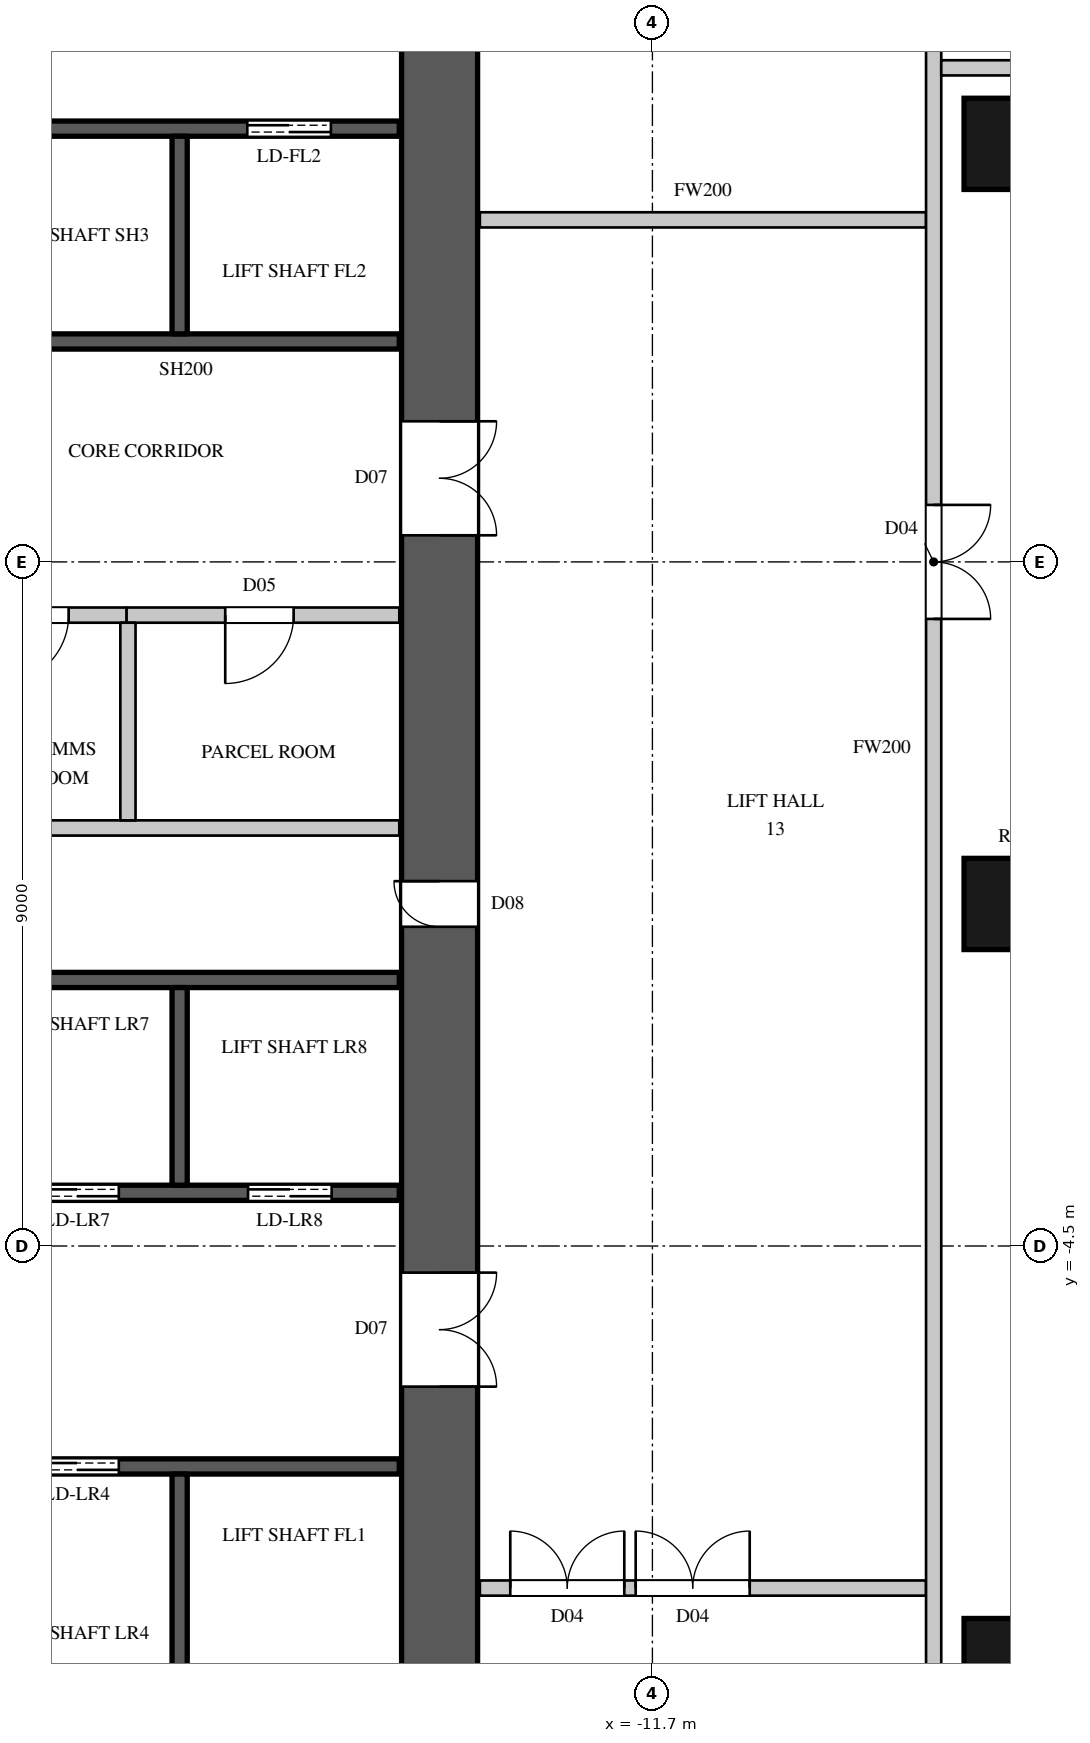
"""IFC4 building model, lengths in metres.
Left out: names, types, materials, properties, quantities, classifications, styles, units other than length and angle.
Written with IfcOpenShell. Run it as: python <this file> out.ifc"""

import sys

from ifc_helpers import new_model, si_unit, direction, frame, frame_2d, origin, origin_2d, place, context, subcontext, project, spatial, rectangle, circle, extrude, element, fill, save


model = new_model("IFC4")
c1 = context("Model", 3, precision=1e-05, world=origin(), true_north=direction((0.0, 1.0)))
c2 = subcontext(c1, "Body", "Model", "MODEL_VIEW")
j1 = project(units=[si_unit("LENGTHUNIT", "METRE"), si_unit("PLANEANGLEUNIT", "RADIAN")], contexts=[c1])
p1 = place(None, origin())
s1 = spatial("IfcSite", under=j1, at=p1, CompositionType="ELEMENT")
p2 = place(p1, origin())
s2 = spatial("IfcBuilding", under=s1, at=p2, CompositionType="ELEMENT")
p3 = place(p2, frame((0.0, 0.0, 77.1)))
s3 = spatial("IfcBuildingStorey", under=s2, at=p3, CompositionType="ELEMENT", Elevation=77.1)
for number, where, z_axis, x_axis in (
    (1, (-7.0, -10.0, 0.0), (0.0, 0.0, 1.0), (1.0, 0.0, 0.0)),
    (2, (-7.0, 0.0, 0.0), (0.0, 0.0, 1.0), (1.0, 0.0, 0.0)),
    (3, (-7.0, 10.0, 0.0), (0.0, 0.0, 1.0), (1.0, 0.0, 0.0)),
):
    element("IfcColumn", number, at=place(p3, frame(where, z_axis=z_axis, x_axis=x_axis)), inside=s3, PredefinedType="COLUMN", context=c2, shape_type="SweptSolid", body=[
        extrude(circle(Radius=0.6, at=origin_2d()), origin(), (0.0, 0.0, 1.0), 3.6),
    ])
p4 = place(p3, frame((-14.5, -14.8, 0.0), z_axis=(0.0, 0.0, 1.0), x_axis=(0.0, 1.0, 0.0)))
e4 = element("IfcWall", 4, at=p4, inside=s3, PredefinedType="SHEAR", context=c2, shape_type="SweptSolid", body=[
    extrude(rectangle(XDim=29.6, YDim=1.0, at=frame_2d((14.8, 0.0))), origin(), (0.0, 0.0, 1.0), 3.6),
])
p5 = place(p4, frame((8.45, 0.0, 0.0)))
e5 = element("IfcOpeningElement", 5, at=p5, cuts=e4, PredefinedType="OPENING", context=c2, shape_type="SweptSolid", body=[
    extrude(rectangle(XDim=1.5, YDim=2.4, at=frame_2d((0.75, 1.2))), frame((0.0, 0.51, 0.0), z_axis=(0.0, -1.0, 0.0), x_axis=(1.0, 0.0, 0.0)), (0.0, 0.0, 1.0), 1.02),
])
p6 = place(p4, frame((19.65, 0.0, 0.0)))
e6 = element("IfcOpeningElement", 6, at=p6, cuts=e4, PredefinedType="OPENING", context=c2, shape_type="SweptSolid", body=[
    extrude(rectangle(XDim=1.5, YDim=2.4, at=frame_2d((0.75, 1.2))), frame((0.0, 0.51, 0.0), z_axis=(0.0, -1.0, 0.0), x_axis=(1.0, 0.0, 0.0)), (0.0, 0.0, 1.0), 1.02),
])
p7 = place(p4, frame((14.5, 0.0, 0.0)))
e7 = element("IfcOpeningElement", 7, at=p7, cuts=e4, PredefinedType="OPENING", context=c2, shape_type="SweptSolid", body=[
    extrude(rectangle(XDim=0.6, YDim=2.0, at=frame_2d((0.3, 1.0))), frame((0.0, 0.51, 0.0), z_axis=(0.0, -1.0, 0.0), x_axis=(1.0, 0.0, 0.0)), (0.0, 0.0, 1.0), 1.02),
])
p8 = place(p3, frame((-18.62, 3.8, 0.0), z_axis=(0.0, 0.0, 1.0), x_axis=(1.0, 0.0, 0.0)))
e8 = element("IfcWall", 8, at=p8, inside=s3, PredefinedType="PARTITIONING", context=c2, shape_type="SweptSolid", body=[
    extrude(rectangle(XDim=3.59, YDim=0.2, at=frame_2d((1.795, 0.0))), origin(), (0.0, 0.0, 1.0), 3.3),
])
p9 = place(p8, frame((1.3, 0.0, 0.0)))
e9 = element("IfcOpeningElement", 9, at=p9, cuts=e8, PredefinedType="OPENING", context=c2, shape_type="SweptSolid", body=[
    extrude(rectangle(XDim=0.9, YDim=2.2, at=frame_2d((0.45, 1.1))), frame((0.0, 0.11, 0.0), z_axis=(0.0, -1.0, 0.0), x_axis=(1.0, 0.0, 0.0)), (0.0, 0.0, 1.0), 0.22),
])
p10 = place(p3, frame((-13.97, -9.0, 0.0), z_axis=(0.0, 0.0, 1.0), x_axis=(1.0, 0.0, 0.0)))
e10 = element("IfcWall", 10, at=p10, inside=s3, PredefinedType="PARTITIONING", context=c2, shape_type="SweptSolid", body=[
    extrude(rectangle(XDim=5.87, YDim=0.2, at=frame_2d((2.935, 0.0))), origin(), (0.0, 0.0, 1.0), 3.3),
])
p11 = place(p10, frame((0.4, 0.0, 0.0)))
e11 = element("IfcOpeningElement", 11, at=p11, cuts=e10, PredefinedType="OPENING", context=c2, shape_type="SweptSolid", body=[
    extrude(rectangle(XDim=1.5, YDim=2.2, at=frame_2d((0.75, 1.1))), frame((0.0, 0.11, 0.0), z_axis=(0.0, -1.0, 0.0), x_axis=(1.0, 0.0, 0.0)), (0.0, 0.0, 1.0), 0.22),
])
p12 = place(p10, frame((2.05, 0.0, 0.0)))
e12 = element("IfcOpeningElement", 12, at=p12, cuts=e10, PredefinedType="OPENING", context=c2, shape_type="SweptSolid", body=[
    extrude(rectangle(XDim=1.5, YDim=2.2, at=frame_2d((0.75, 1.1))), frame((0.0, 0.11, 0.0), z_axis=(0.0, -1.0, 0.0), x_axis=(1.0, 0.0, 0.0)), (0.0, 0.0, 1.0), 0.22),
])
p13 = place(p3, frame((-13.97, 9.0, 0.0), z_axis=(0.0, 0.0, 1.0), x_axis=(1.0, 0.0, 0.0)))
e13 = element("IfcWall", 13, at=p13, inside=s3, PredefinedType="PARTITIONING", context=c2, shape_type="SweptSolid", body=[
    extrude(rectangle(XDim=5.87, YDim=0.2, at=frame_2d((2.935, 0.0))), origin(), (0.0, 0.0, 1.0), 3.3),
])
p14 = place(p3, frame((-8.0, -10.9, 0.0), z_axis=(0.0, 0.0, 1.0), x_axis=(0.0, 1.0, 0.0)))
e14 = element("IfcWall", 14, at=p14, inside=s3, PredefinedType="PARTITIONING", context=c2, shape_type="SweptSolid", body=[
    extrude(rectangle(XDim=25.9, YDim=0.2, at=frame_2d((12.95, 0.0))), origin(), (0.0, 0.0, 1.0), 3.3),
])
p15 = place(p14, frame((14.65, 0.0, 0.0)))
e15 = element("IfcOpeningElement", 15, at=p15, cuts=e14, PredefinedType="OPENING", context=c2, shape_type="SweptSolid", body=[
    extrude(rectangle(XDim=1.5, YDim=2.2, at=frame_2d((0.75, 1.1))), frame((0.0, 0.11, 0.0), z_axis=(0.0, -1.0, 0.0), x_axis=(1.0, 0.0, 0.0)), (0.0, 0.0, 1.0), 0.22),
])
p16 = place(p14, frame((24.15, 0.0, 0.0)))
e16 = element("IfcOpeningElement", 16, at=p16, cuts=e14, PredefinedType="OPENING", context=c2, shape_type="SweptSolid", body=[
    extrude(rectangle(XDim=1.6, YDim=2.4, at=frame_2d((0.8, 1.2))), frame((0.0, 0.11, 0.0), z_axis=(0.0, -1.0, 0.0), x_axis=(1.0, 0.0, 0.0)), (0.0, 0.0, 1.0), 0.22),
])
p17 = place(p3, frame((-7.9, 11.0, 0.0), z_axis=(0.0, 0.0, 1.0), x_axis=(1.0, 0.0, 0.0)))
e17 = element("IfcWall", 17, at=p17, inside=s3, PredefinedType="PARTITIONING", context=c2, shape_type="SweptSolid", body=[
    extrude(rectangle(XDim=17.9, YDim=0.2, at=frame_2d((8.95, 0.0))), origin(), (0.0, 0.0, 1.0), 3.3),
])
p18 = place(p17, frame((9.5, 0.0, 0.0)))
e18 = element("IfcOpeningElement", 18, at=p18, cuts=e17, PredefinedType="OPENING", context=c2, shape_type="SweptSolid", body=[
    extrude(rectangle(XDim=1.5, YDim=2.2, at=frame_2d((0.75, 1.1))), frame((0.0, 0.11, 0.0), z_axis=(0.0, -1.0, 0.0), x_axis=(1.0, 0.0, 0.0)), (0.0, 0.0, 1.0), 0.22),
])
p19 = place(p3, frame((-26.1, 1.0, 0.0), z_axis=(0.0, 0.0, 1.0), x_axis=(1.0, 0.0, 0.0)))
e19 = element("IfcWall", 19, at=p19, inside=s3, PredefinedType="PARTITIONING", context=c2, shape_type="SweptSolid", body=[
    extrude(rectangle(XDim=11.07, YDim=0.2, at=frame_2d((5.535, 0.0))), origin(), (0.0, 0.0, 1.0), 3.3),
])
p20 = place(p3, frame((-20.98, 3.8, 0.0), z_axis=(0.0, 0.0, 1.0), x_axis=(1.0, 0.0, 0.0)))
e20 = element("IfcWall", 20, at=p20, inside=s3, PredefinedType="PARTITIONING", context=c2, shape_type="SweptSolid", body=[
    extrude(rectangle(XDim=2.36, YDim=0.2, at=frame_2d((1.18, 0.0))), origin(), (0.0, 0.0, 1.0), 3.3),
])
p21 = place(p20, frame((0.7, 0.0, 0.0)))
e21 = element("IfcOpeningElement", 21, at=p21, cuts=e20, PredefinedType="OPENING", context=c2, shape_type="SweptSolid", body=[
    extrude(rectangle(XDim=0.9, YDim=2.2, at=frame_2d((0.45, 1.1))), frame((0.0, 0.11, 0.0), z_axis=(0.0, -1.0, 0.0), x_axis=(1.0, 0.0, 0.0)), (0.0, 0.0, 1.0), 0.22),
])
p22 = place(p3, frame((-18.6, 1.1, 0.0), z_axis=(0.0, 0.0, 1.0), x_axis=(0.0, 1.0, 0.0)))
e22 = element("IfcWall", 22, at=p22, inside=s3, PredefinedType="PARTITIONING", context=c2, shape_type="SweptSolid", body=[
    extrude(rectangle(XDim=2.6, YDim=0.2, at=frame_2d((1.3, 0.0))), origin(), (0.0, 0.0, 1.0), 3.3),
])
p23 = place(p3, frame((-28.97, -7.4, 0.0), z_axis=(0.0, 0.0, 1.0), x_axis=(1.0, 0.0, 0.0)))
e23 = element("IfcWall", 23, at=p23, inside=s3, PredefinedType="SHEAR", context=c2, shape_type="SweptSolid", body=[
    extrude(rectangle(XDim=13.94, YDim=0.2, at=frame_2d((6.97, 0.0))), origin(), (0.0, 0.0, 1.0), 3.3),
])
p24 = place(p23, frame((0.9, 0.0, 0.0)))
e24 = element("IfcOpeningElement", 24, at=p24, cuts=e23, PredefinedType="OPENING", context=c2, shape_type="SweptSolid", body=[
    extrude(rectangle(XDim=1.1, YDim=2.2, at=frame_2d((0.55, 1.1))), frame((0.0, 0.11, 0.0), z_axis=(0.0, -1.0, 0.0), x_axis=(1.0, 0.0, 0.0)), (0.0, 0.0, 1.0), 0.22),
])
p25 = place(p23, frame((3.7, 0.0, 0.0)))
e25 = element("IfcOpeningElement", 25, at=p25, cuts=e23, PredefinedType="OPENING", context=c2, shape_type="SweptSolid", body=[
    extrude(rectangle(XDim=1.1, YDim=2.2, at=frame_2d((0.55, 1.1))), frame((0.0, 0.11, 0.0), z_axis=(0.0, -1.0, 0.0), x_axis=(1.0, 0.0, 0.0)), (0.0, 0.0, 1.0), 0.22),
])
p26 = place(p23, frame((6.4, 0.0, 0.0)))
e26 = element("IfcOpeningElement", 26, at=p26, cuts=e23, PredefinedType="OPENING", context=c2, shape_type="SweptSolid", body=[
    extrude(rectangle(XDim=1.1, YDim=2.2, at=frame_2d((0.55, 1.1))), frame((0.0, 0.11, 0.0), z_axis=(0.0, -1.0, 0.0), x_axis=(1.0, 0.0, 0.0)), (0.0, 0.0, 1.0), 0.22),
])
p27 = place(p23, frame((9.15, 0.0, 0.0)))
e27 = element("IfcOpeningElement", 27, at=p27, cuts=e23, PredefinedType="OPENING", context=c2, shape_type="SweptSolid", body=[
    extrude(rectangle(XDim=1.1, YDim=2.2, at=frame_2d((0.55, 1.1))), frame((0.0, 0.11, 0.0), z_axis=(0.0, -1.0, 0.0), x_axis=(1.0, 0.0, 0.0)), (0.0, 0.0, 1.0), 0.22),
])
p28 = place(p3, frame((-28.97, -3.8, 0.0), z_axis=(0.0, 0.0, 1.0), x_axis=(1.0, 0.0, 0.0)))
e28 = element("IfcWall", 28, at=p28, inside=s3, PredefinedType="SHEAR", context=c2, shape_type="SweptSolid", body=[
    extrude(rectangle(XDim=13.94, YDim=0.2, at=frame_2d((6.97, 0.0))), origin(), (0.0, 0.0, 1.0), 3.3),
])
p29 = place(p28, frame((3.7, 0.0, 0.0)))
e29 = element("IfcOpeningElement", 29, at=p29, cuts=e28, PredefinedType="OPENING", context=c2, shape_type="SweptSolid", body=[
    extrude(rectangle(XDim=1.1, YDim=2.2, at=frame_2d((0.55, 1.1))), frame((0.0, 0.11, 0.0), z_axis=(0.0, -1.0, 0.0), x_axis=(1.0, 0.0, 0.0)), (0.0, 0.0, 1.0), 0.22),
])
p30 = place(p28, frame((6.4, 0.0, 0.0)))
e30 = element("IfcOpeningElement", 30, at=p30, cuts=e28, PredefinedType="OPENING", context=c2, shape_type="SweptSolid", body=[
    extrude(rectangle(XDim=1.1, YDim=2.2, at=frame_2d((0.55, 1.1))), frame((0.0, 0.11, 0.0), z_axis=(0.0, -1.0, 0.0), x_axis=(1.0, 0.0, 0.0)), (0.0, 0.0, 1.0), 0.22),
])
p31 = place(p28, frame((9.15, 0.0, 0.0)))
e31 = element("IfcOpeningElement", 31, at=p31, cuts=e28, PredefinedType="OPENING", context=c2, shape_type="SweptSolid", body=[
    extrude(rectangle(XDim=1.1, YDim=2.2, at=frame_2d((0.55, 1.1))), frame((0.0, 0.11, 0.0), z_axis=(0.0, -1.0, 0.0), x_axis=(1.0, 0.0, 0.0)), (0.0, 0.0, 1.0), 0.22),
])
p32 = place(p28, frame((11.95, 0.0, 0.0)))
e32 = element("IfcOpeningElement", 32, at=p32, cuts=e28, PredefinedType="OPENING", context=c2, shape_type="SweptSolid", body=[
    extrude(rectangle(XDim=1.1, YDim=2.2, at=frame_2d((0.55, 1.1))), frame((0.0, 0.11, 0.0), z_axis=(0.0, -1.0, 0.0), x_axis=(1.0, 0.0, 0.0)), (0.0, 0.0, 1.0), 0.22),
])
p33 = place(p3, frame((-28.97, -1.0, 0.0), z_axis=(0.0, 0.0, 1.0), x_axis=(1.0, 0.0, 0.0)))
e33 = element("IfcWall", 33, at=p33, inside=s3, PredefinedType="SHEAR", context=c2, shape_type="SweptSolid", body=[
    extrude(rectangle(XDim=13.94, YDim=0.2, at=frame_2d((6.97, 0.0))), origin(), (0.0, 0.0, 1.0), 3.3),
])
p34 = place(p3, frame((-20.64, 7.4, 0.0), z_axis=(0.0, 0.0, 1.0), x_axis=(1.0, 0.0, 0.0)))
e34 = element("IfcWall", 34, at=p34, inside=s3, PredefinedType="SHEAR", context=c2, shape_type="SweptSolid", body=[
    extrude(rectangle(XDim=5.61, YDim=0.2, at=frame_2d((2.805, 0.0))), origin(), (0.0, 0.0, 1.0), 3.3),
])
p35 = place(p3, frame((-19.98, 10.2, 0.0), z_axis=(0.0, 0.0, 1.0), x_axis=(1.0, 0.0, 0.0)))
e35 = element("IfcWall", 35, at=p35, inside=s3, PredefinedType="SHEAR", context=c2, shape_type="SweptSolid", body=[
    extrude(rectangle(XDim=4.95, YDim=0.2, at=frame_2d((2.475, 0.0))), origin(), (0.0, 0.0, 1.0), 3.3),
])
p36 = place(p35, frame((2.95, 0.0, 0.0)))
e36 = element("IfcOpeningElement", 36, at=p36, cuts=e35, PredefinedType="OPENING", context=c2, shape_type="SweptSolid", body=[
    extrude(rectangle(XDim=1.1, YDim=2.2, at=frame_2d((0.55, 1.1))), frame((0.0, 0.11, 0.0), z_axis=(0.0, -1.0, 0.0), x_axis=(1.0, 0.0, 0.0)), (0.0, 0.0, 1.0), 0.22),
])
p37 = place(p3, frame((-17.92, -10.1, 0.0), z_axis=(0.0, 0.0, 1.0), x_axis=(0.0, 1.0, 0.0)))
e37 = element("IfcWall", 37, at=p37, inside=s3, PredefinedType="SHEAR", context=c2, shape_type="SweptSolid", body=[
    extrude(rectangle(XDim=2.6, YDim=0.2, at=frame_2d((1.3, 0.0))), origin(), (0.0, 0.0, 1.0), 3.6),
])
p38 = place(p3, frame((-17.92, -3.7, 0.0), z_axis=(0.0, 0.0, 1.0), x_axis=(0.0, 1.0, 0.0)))
e38 = element("IfcWall", 38, at=p38, inside=s3, PredefinedType="SHEAR", context=c2, shape_type="SweptSolid", body=[
    extrude(rectangle(XDim=2.6, YDim=0.2, at=frame_2d((1.3, 0.0))), origin(), (0.0, 0.0, 1.0), 3.6),
])
p39 = place(p3, frame((-17.92, 7.5, 0.0), z_axis=(0.0, 0.0, 1.0), x_axis=(0.0, 1.0, 0.0)))
e39 = element("IfcWall", 39, at=p39, inside=s3, PredefinedType="SHEAR", context=c2, shape_type="SweptSolid", body=[
    extrude(rectangle(XDim=2.6, YDim=0.2, at=frame_2d((1.3, 0.0))), origin(), (0.0, 0.0, 1.0), 3.6),
])
p40 = place(p21, origin())
e40 = element("IfcDoor", 40, at=p40, inside=s3, OperationType="SINGLE_SWING_RIGHT", PredefinedType="DOOR", context=c2, shape_type="SweptSolid", body=[
    extrude(rectangle(XDim=0.9, YDim=2.2, at=frame_2d((0.45, 1.1))), frame((0.0, 0.025, 0.0), z_axis=(0.0, -1.0, 0.0), x_axis=(1.0, 0.0, 0.0)), (0.0, 0.0, 1.0), 0.05),
])
fill(e21, e40)
p41 = place(p9, origin())
e41 = element("IfcDoor", 41, at=p41, inside=s3, OperationType="SINGLE_SWING_RIGHT", PredefinedType="DOOR", context=c2, shape_type="SweptSolid", body=[
    extrude(rectangle(XDim=0.9, YDim=2.2, at=frame_2d((0.45, 1.1))), frame((0.0, 0.025, 0.0), z_axis=(0.0, -1.0, 0.0), x_axis=(1.0, 0.0, 0.0)), (0.0, 0.0, 1.0), 0.05),
])
fill(e9, e41)
p42 = place(p27, origin())
e42 = element("IfcDoor", 42, at=p42, inside=s3, OperationType="DOUBLE_DOOR_SLIDING", PredefinedType="DOOR", context=c2, shape_type="SweptSolid", body=[
    extrude(rectangle(XDim=1.1, YDim=2.2, at=frame_2d((0.55, 1.1))), frame((0.0, 0.025, 0.0), z_axis=(0.0, -1.0, 0.0), x_axis=(1.0, 0.0, 0.0)), (0.0, 0.0, 1.0), 0.05),
])
fill(e27, e42)
p43 = place(p31, origin())
e43 = element("IfcDoor", 43, at=p43, inside=s3, OperationType="DOUBLE_DOOR_SLIDING", PredefinedType="DOOR", context=c2, shape_type="SweptSolid", body=[
    extrude(rectangle(XDim=1.1, YDim=2.2, at=frame_2d((0.55, 1.1))), frame((0.0, 0.025, 0.0), z_axis=(0.0, -1.0, 0.0), x_axis=(1.0, 0.0, 0.0)), (0.0, 0.0, 1.0), 0.05),
])
fill(e31, e43)
p44 = place(p32, origin())
e44 = element("IfcDoor", 44, at=p44, inside=s3, OperationType="DOUBLE_DOOR_SLIDING", PredefinedType="DOOR", context=c2, shape_type="SweptSolid", body=[
    extrude(rectangle(XDim=1.1, YDim=2.2, at=frame_2d((0.55, 1.1))), frame((0.0, 0.025, 0.0), z_axis=(0.0, -1.0, 0.0), x_axis=(1.0, 0.0, 0.0)), (0.0, 0.0, 1.0), 0.05),
])
fill(e32, e44)
p45 = place(p36, origin())
e45 = element("IfcDoor", 45, at=p45, inside=s3, OperationType="DOUBLE_DOOR_SLIDING", PredefinedType="DOOR", context=c2, shape_type="SweptSolid", body=[
    extrude(rectangle(XDim=1.1, YDim=2.2, at=frame_2d((0.55, 1.1))), frame((0.0, 0.025, 0.0), z_axis=(0.0, -1.0, 0.0), x_axis=(1.0, 0.0, 0.0)), (0.0, 0.0, 1.0), 0.05),
])
fill(e36, e45)
p46 = place(p15, origin())
e46 = element("IfcDoor", 46, at=p46, inside=s3, OperationType="DOUBLE_DOOR_SINGLE_SWING", PredefinedType="DOOR", context=c2, shape_type="SweptSolid", body=[
    extrude(rectangle(XDim=1.5, YDim=2.2, at=frame_2d((0.75, 1.1))), frame((0.0, 0.025, 0.0), z_axis=(0.0, -1.0, 0.0), x_axis=(1.0, 0.0, 0.0)), (0.0, 0.0, 1.0), 0.05),
])
fill(e15, e46)
p47 = place(p11, origin())
e47 = element("IfcDoor", 47, at=p47, inside=s3, OperationType="DOUBLE_DOOR_SINGLE_SWING", PredefinedType="DOOR", context=c2, shape_type="SweptSolid", body=[
    extrude(rectangle(XDim=1.5, YDim=2.2, at=frame_2d((0.75, 1.1))), frame((0.0, 0.025, 0.0), z_axis=(0.0, -1.0, 0.0), x_axis=(1.0, 0.0, 0.0)), (0.0, 0.0, 1.0), 0.05),
])
fill(e11, e47)
p48 = place(p12, origin())
e48 = element("IfcDoor", 48, at=p48, inside=s3, OperationType="DOUBLE_DOOR_SINGLE_SWING", PredefinedType="DOOR", context=c2, shape_type="SweptSolid", body=[
    extrude(rectangle(XDim=1.5, YDim=2.2, at=frame_2d((0.75, 1.1))), frame((0.0, 0.025, 0.0), z_axis=(0.0, -1.0, 0.0), x_axis=(1.0, 0.0, 0.0)), (0.0, 0.0, 1.0), 0.05),
])
fill(e12, e48)
p49 = place(p5, origin())
e49 = element("IfcDoor", 49, at=p49, inside=s3, OperationType="DOUBLE_DOOR_SINGLE_SWING", PredefinedType="DOOR", context=c2, shape_type="SweptSolid", body=[
    extrude(rectangle(XDim=1.5, YDim=2.4, at=frame_2d((0.75, 1.2))), frame((0.0, -0.445, 0.0), z_axis=(0.0, -1.0, 0.0), x_axis=(1.0, 0.0, 0.0)), (0.0, 0.0, 1.0), 0.05),
])
fill(e5, e49)
p50 = place(p6, origin())
e50 = element("IfcDoor", 50, at=p50, inside=s3, OperationType="DOUBLE_DOOR_SINGLE_SWING", PredefinedType="DOOR", context=c2, shape_type="SweptSolid", body=[
    extrude(rectangle(XDim=1.5, YDim=2.4, at=frame_2d((0.75, 1.2))), frame((0.0, -0.445, 0.0), z_axis=(0.0, -1.0, 0.0), x_axis=(1.0, 0.0, 0.0)), (0.0, 0.0, 1.0), 0.05),
])
fill(e6, e50)
p51 = place(p7, origin())
e51 = element("IfcDoor", 51, at=p51, inside=s3, OperationType="SINGLE_SWING_RIGHT", PredefinedType="DOOR", context=c2, shape_type="SweptSolid", body=[
    extrude(rectangle(XDim=0.6, YDim=2.0, at=frame_2d((0.3, 1.0))), frame((0.0, 0.495, 0.0), z_axis=(0.0, -1.0, 0.0), x_axis=(1.0, 0.0, 0.0)), (0.0, 0.0, 1.0), 0.05),
])
fill(e7, e51)
save(model, sys.argv[1])
